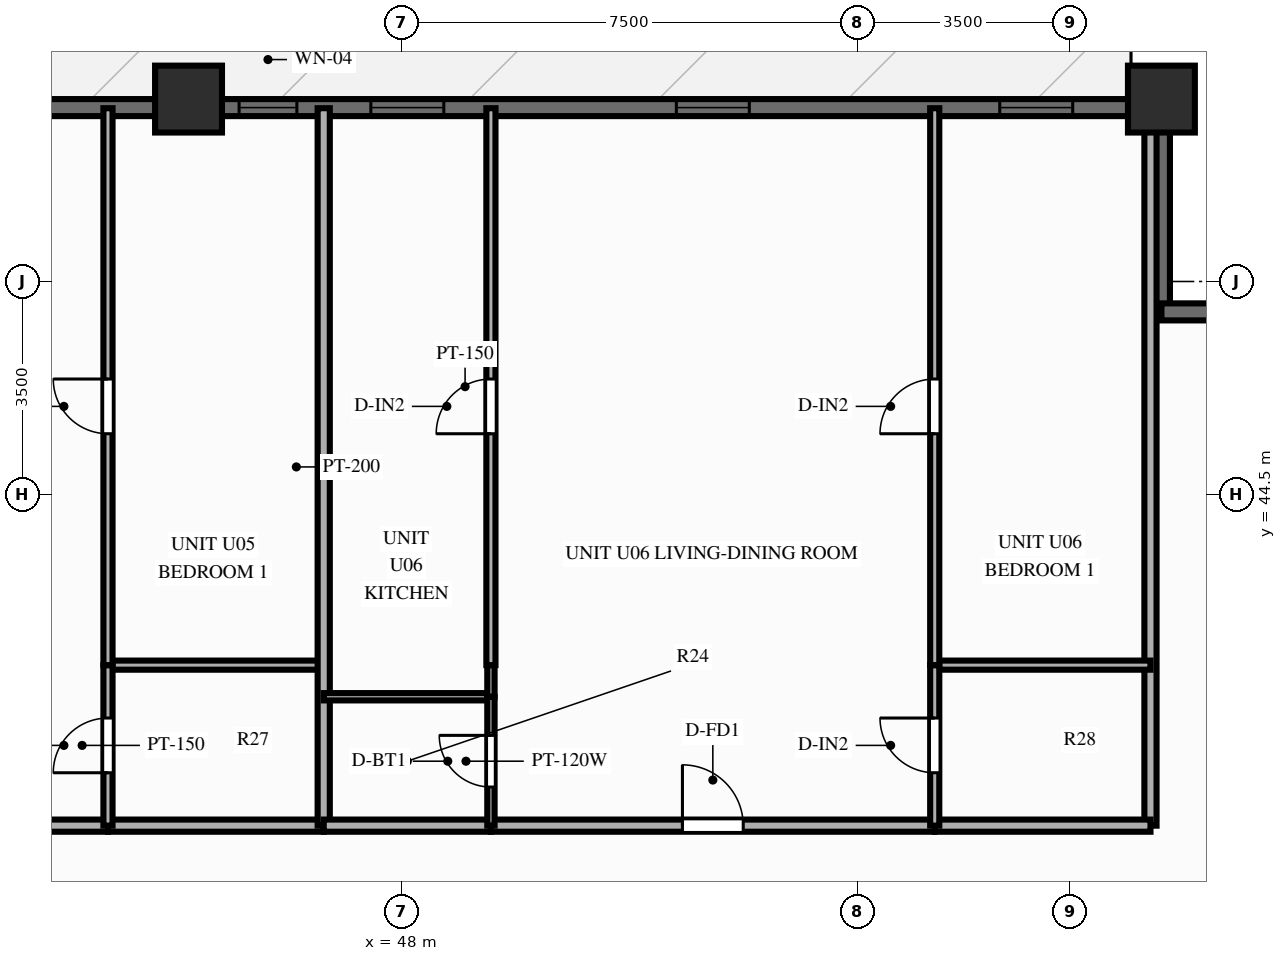
"""IFC4 building model, lengths in metres.
Left out: names, types, materials, properties, quantities, classifications, styles, units other than length and angle.
Written with IfcOpenShell. Run it as: python <this file> out.ifc"""

import sys

from ifc_helpers import new_model, si_unit, direction, frame, frame_2d, origin, origin_2d, place, context, subcontext, project, spatial, rectangle, extrude, source, transform, mapped, element, fill, save


model = new_model("IFC4")
c1 = context("Model", 3, precision=1e-05, world=origin(), true_north=direction((0.0, 1.0)))
c2 = subcontext(c1, "Body", "Model", "MODEL_VIEW")
j1 = project(units=[si_unit("LENGTHUNIT", "METRE"), si_unit("PLANEANGLEUNIT", "RADIAN")], contexts=[c1])
p1 = place(None, origin())
s1 = spatial("IfcSite", under=j1, at=p1, CompositionType="ELEMENT")
p2 = place(p1, origin())
s2 = spatial("IfcBuilding", under=s1, at=p2, CompositionType="ELEMENT")
p3 = place(p2, frame((0.0, 0.0, 49.4)))
s3 = spatial("IfcBuildingStorey", under=s2, at=p3, CompositionType="ELEMENT", Elevation=49.4)
m1 = source(origin(), c2, "Body", "SweptSolid", [
    extrude(rectangle(XDim=1.1, YDim=1.1, at=origin_2d()), origin(), (0.0, 0.0, 1.0), 3.0),
])
for number, where, z_axis, x_axis in (
    (1, (60.5, 51.0, 0.0), (0.0, 0.0, 1.0), (1.0, 0.0, 0.0)),
    (2, (44.5, 51.0, 0.0), (0.0, 0.0, 1.0), (1.0, 0.0, 0.0)),
):
    element("IfcColumn", number, at=place(p3, frame(where, z_axis=z_axis, x_axis=x_axis)), inside=s3, PredefinedType="COLUMN", context=c2, shape_type="MappedRepresentation", body=[
        mapped(m1, transform((0.0, 0.0, 0.0), scale=1.0)),
    ])
p4 = place(p3, frame((15.5, 50.86, 0.0), z_axis=(0.0, 0.0, 1.0), x_axis=(1.0, 0.0, 0.0)))
e3 = element("IfcWall", 3, at=p4, inside=s3, PredefinedType="SOLIDWALL", context=c2, shape_type="SweptSolid", body=[
    extrude(rectangle(XDim=45.0, YDim=0.28, at=frame_2d((22.5, 0.0))), origin(), (0.0, 0.0, 1.0), 2.28),
])
p5 = place(p4, frame((0.76, 0.0, 0.25)))
e4 = element("IfcOpeningElement", 4, at=p5, cuts=e3, PredefinedType="OPENING", context=c2, shape_type="SweptSolid", body=[
    extrude(rectangle(XDim=1.2, YDim=1.5, at=frame_2d((0.6, 0.75))), frame((0.0, 0.152, 0.0), z_axis=(0.0, -1.0, 0.0), x_axis=(1.0, 0.0, 0.0)), (0.0, 0.0, 1.0), 0.304),
])
p6 = place(p4, frame((2.83, 0.0, 0.25)))
e5 = element("IfcOpeningElement", 5, at=p6, cuts=e3, PredefinedType="OPENING", context=c2, shape_type="SweptSolid", body=[
    extrude(rectangle(XDim=1.2, YDim=1.5, at=frame_2d((0.6, 0.75))), frame((0.0, 0.152, 0.0), z_axis=(0.0, -1.0, 0.0), x_axis=(1.0, 0.0, 0.0)), (0.0, 0.0, 1.0), 0.304),
])
p7 = place(p4, frame((5.135, 0.0, 0.25)))
e6 = element("IfcOpeningElement", 6, at=p7, cuts=e3, PredefinedType="OPENING", context=c2, shape_type="SweptSolid", body=[
    extrude(rectangle(XDim=1.2, YDim=1.5, at=frame_2d((0.6, 0.75))), frame((0.0, 0.152, 0.0), z_axis=(0.0, -1.0, 0.0), x_axis=(1.0, 0.0, 0.0)), (0.0, 0.0, 1.0), 0.304),
])
p8 = place(p4, frame((7.753, 0.0, 0.25)))
e7 = element("IfcOpeningElement", 7, at=p8, cuts=e3, PredefinedType="OPENING", context=c2, shape_type="SweptSolid", body=[
    extrude(rectangle(XDim=1.2, YDim=1.5, at=frame_2d((0.6, 0.75))), frame((0.0, 0.152, 0.0), z_axis=(0.0, -1.0, 0.0), x_axis=(1.0, 0.0, 0.0)), (0.0, 0.0, 1.0), 0.304),
])
p9 = place(p4, frame((10.266, 0.0, 0.25)))
e8 = element("IfcOpeningElement", 8, at=p9, cuts=e3, PredefinedType="OPENING", context=c2, shape_type="SweptSolid", body=[
    extrude(rectangle(XDim=1.2, YDim=1.5, at=frame_2d((0.6, 0.75))), frame((0.0, 0.152, 0.0), z_axis=(0.0, -1.0, 0.0), x_axis=(1.0, 0.0, 0.0)), (0.0, 0.0, 1.0), 0.304),
])
p10 = place(p4, frame((12.571, 0.0, 0.25)))
e9 = element("IfcOpeningElement", 9, at=p10, cuts=e3, PredefinedType="OPENING", context=c2, shape_type="SweptSolid", body=[
    extrude(rectangle(XDim=1.2, YDim=1.5, at=frame_2d((0.6, 0.75))), frame((0.0, 0.152, 0.0), z_axis=(0.0, -1.0, 0.0), x_axis=(1.0, 0.0, 0.0)), (0.0, 0.0, 1.0), 0.304),
])
p11 = place(p4, frame((14.643, 0.0, 0.25)))
e10 = element("IfcOpeningElement", 10, at=p11, cuts=e3, PredefinedType="OPENING", context=c2, shape_type="SweptSolid", body=[
    extrude(rectangle(XDim=0.7, YDim=1.5, at=frame_2d((0.35, 0.75))), frame((0.0, 0.152, 0.0), z_axis=(0.0, -1.0, 0.0), x_axis=(1.0, 0.0, 0.0)), (0.0, 0.0, 1.0), 0.304),
])
p12 = place(p4, frame((17.977, 0.0, 0.25)))
e11 = element("IfcOpeningElement", 11, at=p12, cuts=e3, PredefinedType="OPENING", context=c2, shape_type="SweptSolid", body=[
    extrude(rectangle(XDim=1.2, YDim=1.5, at=frame_2d((0.6, 0.75))), frame((0.0, 0.152, 0.0), z_axis=(0.0, -1.0, 0.0), x_axis=(1.0, 0.0, 0.0)), (0.0, 0.0, 1.0), 0.304),
])
p13 = place(p4, frame((23.263, 0.0, 0.0)))
e12 = element("IfcOpeningElement", 12, at=p13, cuts=e3, PredefinedType="OPENING", context=c2, shape_type="SweptSolid", body=[
    extrude(rectangle(XDim=1.1, YDim=2.15, at=frame_2d((0.55, 1.075))), frame((0.0, 0.152, 0.0), z_axis=(0.0, -1.0, 0.0), x_axis=(1.0, 0.0, 0.0)), (0.0, 0.0, 1.0), 0.304),
])
p14 = place(p4, frame((29.832, 0.0, 0.25)))
e13 = element("IfcOpeningElement", 13, at=p14, cuts=e3, PredefinedType="OPENING", context=c2, shape_type="SweptSolid", body=[
    extrude(rectangle(XDim=0.95, YDim=1.5, at=frame_2d((0.475, 0.75))), frame((0.0, 0.152, 0.0), z_axis=(0.0, -1.0, 0.0), x_axis=(1.0, 0.0, 0.0)), (0.0, 0.0, 1.0), 0.304),
])
p15 = place(p4, frame((31.998, 0.0, 0.25)))
e14 = element("IfcOpeningElement", 14, at=p15, cuts=e3, PredefinedType="OPENING", context=c2, shape_type="SweptSolid", body=[
    extrude(rectangle(XDim=1.2, YDim=1.5, at=frame_2d((0.6, 0.75))), frame((0.0, 0.152, 0.0), z_axis=(0.0, -1.0, 0.0), x_axis=(1.0, 0.0, 0.0)), (0.0, 0.0, 1.0), 0.304),
])
p16 = place(p4, frame((37.023, 0.0, 0.25)))
e15 = element("IfcOpeningElement", 15, at=p16, cuts=e3, PredefinedType="OPENING", context=c2, shape_type="SweptSolid", body=[
    extrude(rectangle(XDim=1.2, YDim=1.5, at=frame_2d((0.6, 0.75))), frame((0.0, 0.152, 0.0), z_axis=(0.0, -1.0, 0.0), x_axis=(1.0, 0.0, 0.0)), (0.0, 0.0, 1.0), 0.304),
])
p17 = place(p4, frame((42.341, 0.0, 0.25)))
e16 = element("IfcOpeningElement", 16, at=p17, cuts=e3, PredefinedType="OPENING", context=c2, shape_type="SweptSolid", body=[
    extrude(rectangle(XDim=1.2, YDim=1.5, at=frame_2d((0.6, 0.75))), frame((0.0, 0.152, 0.0), z_axis=(0.0, -1.0, 0.0), x_axis=(1.0, 0.0, 0.0)), (0.0, 0.0, 1.0), 0.304),
])
for number, where, z_axis, x_axis in (
    (17, (60.5, 47.5, 0.0), (0.0, 0.0, 1.0), (0.0, 1.0, 0.0)),
    (18, (60.5, 47.5, 0.0), (0.0, 0.0, 1.0), (1.0, 0.0, 0.0)),
):
    element("IfcWall", number, at=place(p3, frame(where, z_axis=z_axis, x_axis=x_axis)), inside=s3, PredefinedType="SOLIDWALL", context=c2, shape_type="SweptSolid", body=[
        extrude(rectangle(XDim=3.42, YDim=0.28, at=frame_2d((1.71, 0.0))), origin(), (0.0, 0.0, 1.0), 2.28),
    ])
p18 = place(p3, frame((60.32, 39.05, 0.0), z_axis=(0.0, 0.0, 1.0), x_axis=(0.0, 1.0, 0.0)))
e19 = element("IfcWall", 19, at=p18, inside=s3, PredefinedType="PARTITIONING", context=c2, shape_type="SweptSolid", body=[
    extrude(rectangle(XDim=11.8, YDim=0.2, at=frame_2d((5.9, 0.0))), origin(), (0.0, 0.0, 1.0), 2.79),
])
p19 = place(p3, frame((35.451, 39.05, 0.0), z_axis=(0.0, 0.0, 1.0), x_axis=(1.0, 0.0, 0.0)))
e20 = element("IfcWall", 20, at=p19, inside=s3, PredefinedType="PARTITIONING", context=c2, shape_type="SweptSolid", body=[
    extrude(rectangle(XDim=7.724, YDim=0.2, at=frame_2d((3.862, 0.0))), origin(), (0.0, 0.0, 1.0), 2.79),
])
p20 = place(p19, frame((3.362, 0.0, 0.0)))
e21 = element("IfcOpeningElement", 21, at=p20, cuts=e20, PredefinedType="OPENING", context=c2, shape_type="SweptSolid", body=[
    extrude(rectangle(XDim=1.0, YDim=2.15, at=frame_2d((0.5, 1.075))), frame((0.0, 0.112, 0.0), z_axis=(0.0, -1.0, 0.0), x_axis=(1.0, 0.0, 0.0)), (0.0, 0.0, 1.0), 0.224),
])
p21 = place(p3, frame((43.175, 39.05, 0.0), z_axis=(0.0, 0.0, 1.0), x_axis=(1.0, 0.0, 0.0)))
e22 = element("IfcWall", 22, at=p21, inside=s3, PredefinedType="PARTITIONING", context=c2, shape_type="SweptSolid", body=[
    extrude(rectangle(XDim=3.548, YDim=0.2, at=frame_2d((1.774, 0.0))), origin(), (0.0, 0.0, 1.0), 2.79),
])
p22 = place(p3, frame((43.175, 41.69, 0.0), z_axis=(0.0, 0.0, 1.0), x_axis=(1.0, 0.0, 0.0)))
e23 = element("IfcWall", 23, at=p22, inside=s3, PredefinedType="PARTITIONING", context=c2, shape_type="SweptSolid", body=[
    extrude(rectangle(XDim=3.548, YDim=0.15, at=frame_2d((1.774, 0.0))), origin(), (0.0, 0.0, 1.0), 2.79),
])
p23 = place(p3, frame((43.175, 39.05, 0.0), z_axis=(0.0, 0.0, 1.0), x_axis=(0.0, 1.0, 0.0)))
e24 = element("IfcWall", 24, at=p23, inside=s3, PredefinedType="PARTITIONING", context=c2, shape_type="SweptSolid", body=[
    extrude(rectangle(XDim=2.64, YDim=0.15, at=frame_2d((1.32, 0.0))), origin(), (0.0, 0.0, 1.0), 2.79),
])
p24 = place(p23, frame((0.87, 0.0, 0.0)))
e25 = element("IfcOpeningElement", 25, at=p24, cuts=e24, PredefinedType="OPENING", context=c2, shape_type="SweptSolid", body=[
    extrude(rectangle(XDim=0.9, YDim=2.1, at=frame_2d((0.45, 1.05))), frame((0.0, 0.087, 0.0), z_axis=(0.0, -1.0, 0.0), x_axis=(1.0, 0.0, 0.0)), (0.0, 0.0, 1.0), 0.174),
])
p25 = place(p3, frame((43.175, 41.69, 0.0), z_axis=(0.0, 0.0, 1.0), x_axis=(0.0, 1.0, 0.0)))
e26 = element("IfcWall", 26, at=p25, inside=s3, PredefinedType="PARTITIONING", context=c2, shape_type="SweptSolid", body=[
    extrude(rectangle(XDim=9.16, YDim=0.15, at=frame_2d((4.58, 0.0))), origin(), (0.0, 0.0, 1.0), 2.79),
])
p26 = place(p25, frame((3.806, 0.0, 0.0)))
e27 = element("IfcOpeningElement", 27, at=p26, cuts=e26, PredefinedType="OPENING", context=c2, shape_type="SweptSolid", body=[
    extrude(rectangle(XDim=0.9, YDim=2.1, at=frame_2d((0.45, 1.05))), frame((0.0, 0.087, 0.0), z_axis=(0.0, -1.0, 0.0), x_axis=(1.0, 0.0, 0.0)), (0.0, 0.0, 1.0), 0.174),
])
p27 = place(p3, frame((46.723, 39.05, 0.0), z_axis=(0.0, 0.0, 1.0), x_axis=(0.0, 1.0, 0.0)))
e28 = element("IfcWall", 28, at=p27, inside=s3, PredefinedType="PARTITIONING", context=c2, shape_type="SweptSolid", body=[
    extrude(rectangle(XDim=11.8, YDim=0.2, at=frame_2d((5.9, 0.0))), origin(), (0.0, 0.0, 1.0), 2.79),
])
p28 = place(p3, frame((46.723, 39.05, 0.0), z_axis=(0.0, 0.0, 1.0), x_axis=(1.0, 0.0, 0.0)))
e29 = element("IfcWall", 29, at=p28, inside=s3, PredefinedType="PARTITIONING", context=c2, shape_type="SweptSolid", body=[
    extrude(rectangle(XDim=2.75, YDim=0.2, at=frame_2d((1.375, 0.0))), origin(), (0.0, 0.0, 1.0), 2.79),
])
p29 = place(p3, frame((49.473, 39.05, 0.0), z_axis=(0.0, 0.0, 1.0), x_axis=(1.0, 0.0, 0.0)))
e30 = element("IfcWall", 30, at=p29, inside=s3, PredefinedType="PARTITIONING", context=c2, shape_type="SweptSolid", body=[
    extrude(rectangle(XDim=7.299, YDim=0.2, at=frame_2d((3.649, 0.0))), origin(), (0.0, 0.0, 1.0), 2.79),
])
p30 = place(p29, frame((3.149, 0.0, 0.0)))
e31 = element("IfcOpeningElement", 31, at=p30, cuts=e30, PredefinedType="OPENING", context=c2, shape_type="SweptSolid", body=[
    extrude(rectangle(XDim=1.0, YDim=2.15, at=frame_2d((0.5, 1.075))), frame((0.0, 0.112, 0.0), z_axis=(0.0, -1.0, 0.0), x_axis=(1.0, 0.0, 0.0)), (0.0, 0.0, 1.0), 0.224),
])
p31 = place(p3, frame((56.772, 39.05, 0.0), z_axis=(0.0, 0.0, 1.0), x_axis=(1.0, 0.0, 0.0)))
e32 = element("IfcWall", 32, at=p31, inside=s3, PredefinedType="PARTITIONING", context=c2, shape_type="SweptSolid", body=[
    extrude(rectangle(XDim=3.548, YDim=0.2, at=frame_2d((1.774, 0.0))), origin(), (0.0, 0.0, 1.0), 2.79),
])
p32 = place(p3, frame((46.723, 41.17, 0.0), z_axis=(0.0, 0.0, 1.0), x_axis=(1.0, 0.0, 0.0)))
e33 = element("IfcWall", 33, at=p32, inside=s3, PredefinedType="PARTITIONING", context=c2, shape_type="SweptSolid", body=[
    extrude(rectangle(XDim=2.75, YDim=0.12, at=frame_2d((1.375, 0.0))), origin(), (0.0, 0.0, 1.0), 2.79),
])
p33 = place(p3, frame((56.772, 41.69, 0.0), z_axis=(0.0, 0.0, 1.0), x_axis=(1.0, 0.0, 0.0)))
e34 = element("IfcWall", 34, at=p33, inside=s3, PredefinedType="PARTITIONING", context=c2, shape_type="SweptSolid", body=[
    extrude(rectangle(XDim=3.548, YDim=0.15, at=frame_2d((1.774, 0.0))), origin(), (0.0, 0.0, 1.0), 2.79),
])
p34 = place(p3, frame((49.473, 39.05, 0.0), z_axis=(0.0, 0.0, 1.0), x_axis=(0.0, 1.0, 0.0)))
e35 = element("IfcWall", 35, at=p34, inside=s3, PredefinedType="PARTITIONING", context=c2, shape_type="SweptSolid", body=[
    extrude(rectangle(XDim=2.12, YDim=0.12, at=frame_2d((1.06, 0.0))), origin(), (0.0, 0.0, 1.0), 2.79),
])
p35 = place(p34, frame((0.635, 0.0, 0.0)))
e36 = element("IfcOpeningElement", 36, at=p35, cuts=e35, PredefinedType="OPENING", context=c2, shape_type="SweptSolid", body=[
    extrude(rectangle(XDim=0.85, YDim=2.05, at=frame_2d((0.425, 1.025))), frame((0.0, 0.072, 0.0), z_axis=(0.0, -1.0, 0.0), x_axis=(1.0, 0.0, 0.0)), (0.0, 0.0, 1.0), 0.144),
])
p36 = place(p3, frame((49.473, 41.17, 0.0), z_axis=(0.0, 0.0, 1.0), x_axis=(0.0, 1.0, 0.0)))
e37 = element("IfcWall", 37, at=p36, inside=s3, PredefinedType="PARTITIONING", context=c2, shape_type="SweptSolid", body=[
    extrude(rectangle(XDim=0.52, YDim=0.12, at=frame_2d((0.26, 0.0))), origin(), (0.0, 0.0, 1.0), 2.79),
])
p37 = place(p3, frame((49.473, 41.69, 0.0), z_axis=(0.0, 0.0, 1.0), x_axis=(0.0, 1.0, 0.0)))
e38 = element("IfcWall", 38, at=p37, inside=s3, PredefinedType="PARTITIONING", context=c2, shape_type="SweptSolid", body=[
    extrude(rectangle(XDim=9.16, YDim=0.15, at=frame_2d((4.58, 0.0))), origin(), (0.0, 0.0, 1.0), 2.79),
])
p38 = place(p37, frame((3.806, 0.0, 0.0)))
e39 = element("IfcOpeningElement", 39, at=p38, cuts=e38, PredefinedType="OPENING", context=c2, shape_type="SweptSolid", body=[
    extrude(rectangle(XDim=0.9, YDim=2.1, at=frame_2d((0.45, 1.05))), frame((0.0, 0.087, 0.0), z_axis=(0.0, -1.0, 0.0), x_axis=(1.0, 0.0, 0.0)), (0.0, 0.0, 1.0), 0.174),
])
p39 = place(p3, frame((56.772, 39.05, 0.0), z_axis=(0.0, 0.0, 1.0), x_axis=(0.0, 1.0, 0.0)))
e40 = element("IfcWall", 40, at=p39, inside=s3, PredefinedType="PARTITIONING", context=c2, shape_type="SweptSolid", body=[
    extrude(rectangle(XDim=2.64, YDim=0.15, at=frame_2d((1.32, 0.0))), origin(), (0.0, 0.0, 1.0), 2.79),
])
p40 = place(p39, frame((0.87, 0.0, 0.0)))
e41 = element("IfcOpeningElement", 41, at=p40, cuts=e40, PredefinedType="OPENING", context=c2, shape_type="SweptSolid", body=[
    extrude(rectangle(XDim=0.9, YDim=2.1, at=frame_2d((0.45, 1.05))), frame((0.0, 0.087, 0.0), z_axis=(0.0, -1.0, 0.0), x_axis=(1.0, 0.0, 0.0)), (0.0, 0.0, 1.0), 0.174),
])
p41 = place(p3, frame((56.772, 41.69, 0.0), z_axis=(0.0, 0.0, 1.0), x_axis=(0.0, 1.0, 0.0)))
e42 = element("IfcWall", 42, at=p41, inside=s3, PredefinedType="PARTITIONING", context=c2, shape_type="SweptSolid", body=[
    extrude(rectangle(XDim=9.16, YDim=0.15, at=frame_2d((4.58, 0.0))), origin(), (0.0, 0.0, 1.0), 2.79),
])
p42 = place(p41, frame((3.806, 0.0, 0.0)))
e43 = element("IfcOpeningElement", 43, at=p42, cuts=e42, PredefinedType="OPENING", context=c2, shape_type="SweptSolid", body=[
    extrude(rectangle(XDim=0.9, YDim=2.1, at=frame_2d((0.45, 1.05))), frame((0.0, 0.087, 0.0), z_axis=(0.0, -1.0, 0.0), x_axis=(1.0, 0.0, 0.0)), (0.0, 0.0, 1.0), 0.174),
])
m2 = source(origin(), c2, "Body", "SweptSolid", [
    extrude(rectangle(XDim=0.95, YDim=1.5, at=frame_2d((0.475, 0.75))), frame((0.0, 0.03, 0.0), z_axis=(0.0, -1.0, 0.0), x_axis=(1.0, 0.0, 0.0)), (0.0, 0.0, 1.0), 0.06),
])
p43 = place(p14, origin())
e44 = element("IfcWindow", 44, at=p43, inside=s3, PartitioningType="SINGLE_PANEL", PredefinedType="WINDOW", context=c2, shape_type="MappedRepresentation", body=[
    mapped(m2, transform((0.0, 0.0, 0.0), scale=1.0)),
])
fill(e13, e44)
m3 = source(origin(), c2, "Body", "SweptSolid", [
    extrude(rectangle(XDim=1.2, YDim=1.5, at=frame_2d((0.6, 0.75))), frame((0.0, 0.03, 0.0), z_axis=(0.0, -1.0, 0.0), x_axis=(1.0, 0.0, 0.0)), (0.0, 0.0, 1.0), 0.06),
])
p44 = place(p15, origin())
e45 = element("IfcWindow", 45, at=p44, inside=s3, PartitioningType="SINGLE_PANEL", PredefinedType="WINDOW", context=c2, shape_type="MappedRepresentation", body=[
    mapped(m3, transform((0.0, 0.0, 0.0), scale=1.0)),
])
fill(e14, e45)
p45 = place(p16, origin())
e46 = element("IfcWindow", 46, at=p45, inside=s3, PartitioningType="SINGLE_PANEL", PredefinedType="WINDOW", context=c2, shape_type="MappedRepresentation", body=[
    mapped(m3, transform((0.0, 0.0, 0.0), scale=1.0)),
])
fill(e15, e46)
p46 = place(p17, origin())
e47 = element("IfcWindow", 47, at=p46, inside=s3, PartitioningType="SINGLE_PANEL", PredefinedType="WINDOW", context=c2, shape_type="MappedRepresentation", body=[
    mapped(m3, transform((0.0, 0.0, 0.0), scale=1.0)),
])
fill(e16, e47)
m4 = source(origin(), c2, "Body", "SweptSolid", [
    extrude(rectangle(XDim=0.9, YDim=2.1, at=frame_2d((0.45, 1.05))), frame((0.0, 0.025, 0.0), z_axis=(0.0, -1.0, 0.0), x_axis=(1.0, 0.0, 0.0)), (0.0, 0.0, 1.0), 0.05),
])
p47 = place(p24, origin())
e48 = element("IfcDoor", 48, at=p47, inside=s3, OperationType="SINGLE_SWING_LEFT", PredefinedType="DOOR", context=c2, shape_type="MappedRepresentation", body=[
    mapped(m4, transform((0.0, 0.0, 0.0), scale=1.0)),
])
fill(e25, e48)
p48 = place(p26, origin())
e49 = element("IfcDoor", 49, at=p48, inside=s3, OperationType="SINGLE_SWING_RIGHT", PredefinedType="DOOR", context=c2, shape_type="MappedRepresentation", body=[
    mapped(m4, transform((0.0, 0.0, 0.0), scale=1.0)),
])
fill(e27, e49)
m5 = source(origin(), c2, "Body", "SweptSolid", [
    extrude(rectangle(XDim=1.0, YDim=2.15, at=frame_2d((0.5, 1.075))), frame((0.0, 0.025, 0.0), z_axis=(0.0, -1.0, 0.0), x_axis=(1.0, 0.0, 0.0)), (0.0, 0.0, 1.0), 0.05),
])
p49 = place(p30, origin())
e50 = element("IfcDoor", 50, at=p49, inside=s3, OperationType="SINGLE_SWING_LEFT", PredefinedType="DOOR", context=c2, shape_type="MappedRepresentation", body=[
    mapped(m5, transform((0.0, 0.0, 0.0), scale=1.0)),
])
fill(e31, e50)
m6 = source(origin(), c2, "Body", "SweptSolid", [
    extrude(rectangle(XDim=0.85, YDim=2.05, at=frame_2d((0.425, 1.025))), frame((0.0, 0.025, 0.0), z_axis=(0.0, -1.0, 0.0), x_axis=(1.0, 0.0, 0.0)), (0.0, 0.0, 1.0), 0.05),
])
p50 = place(p35, origin())
e51 = element("IfcDoor", 51, at=p50, inside=s3, OperationType="SINGLE_SWING_RIGHT", PredefinedType="DOOR", context=c2, shape_type="MappedRepresentation", body=[
    mapped(m6, transform((0.0, 0.0, 0.0), scale=1.0)),
])
fill(e36, e51)
p51 = place(p38, origin())
e52 = element("IfcDoor", 52, at=p51, inside=s3, OperationType="SINGLE_SWING_LEFT", PredefinedType="DOOR", context=c2, shape_type="MappedRepresentation", body=[
    mapped(m4, transform((0.0, 0.0, 0.0), scale=1.0)),
])
fill(e39, e52)
p52 = place(p40, origin())
e53 = element("IfcDoor", 53, at=p52, inside=s3, OperationType="SINGLE_SWING_RIGHT", PredefinedType="DOOR", context=c2, shape_type="MappedRepresentation", body=[
    mapped(m4, transform((0.0, 0.0, 0.0), scale=1.0)),
])
fill(e41, e53)
p53 = place(p42, origin())
e54 = element("IfcDoor", 54, at=p53, inside=s3, OperationType="SINGLE_SWING_LEFT", PredefinedType="DOOR", context=c2, shape_type="MappedRepresentation", body=[
    mapped(m4, transform((0.0, 0.0, 0.0), scale=1.0)),
])
fill(e43, e54)
save(model, sys.argv[1])
